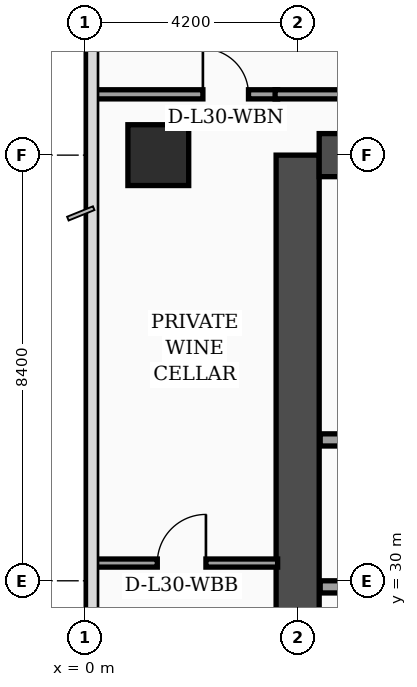
"""IFC4 building model, lengths in metres.
Left out: names, types, materials, properties, quantities, classifications, styles, units other than length and angle.
Written with IfcOpenShell. Run it as: python <this file> out.ifc"""

import sys

from ifc_helpers import new_model, si_unit, direction, frame, frame_2d, origin, origin_2d, place, context, subcontext, project, spatial, rectangle, extrude, element, fill, save


model = new_model("IFC4")
c1 = context("Model", 3, precision=1e-05, world=origin(), true_north=direction((0.0, 1.0)))
c2 = subcontext(c1, "Body", "Model", "MODEL_VIEW")
j1 = project(units=[si_unit("LENGTHUNIT", "METRE"), si_unit("PLANEANGLEUNIT", "RADIAN")], contexts=[c1])
p1 = place(None, origin())
s1 = spatial("IfcSite", under=j1, at=p1, CompositionType="ELEMENT")
p2 = place(p1, origin())
s2 = spatial("IfcBuilding", under=s1, at=p2, CompositionType="ELEMENT")
p3 = place(p2, frame((0.0, 0.0, 124.0)))
s3 = spatial("IfcBuildingStorey", under=s2, at=p3, CompositionType="ELEMENT", Elevation=124.0)
p4 = place(p3, frame((4.2, 16.8, 0.0), z_axis=(0.0, 0.0, 1.0), x_axis=(0.0, 1.0, 0.0)))
e1 = element("IfcWall", 1, at=p4, inside=s3, PredefinedType="SHEAR", context=c2, shape_type="SweptSolid", body=[
    extrude(rectangle(XDim=21.6, YDim=0.85, at=frame_2d((10.8, 0.0))), origin(), (0.0, 0.0, 1.0), 3.56),
])
p5 = place(p3, frame((4.625, 38.4, 0.0), z_axis=(0.0, 0.0, 1.0), x_axis=(1.0, 0.0, 0.0)))
e2 = element("IfcWall", 2, at=p5, inside=s3, PredefinedType="SHEAR", context=c2, shape_type="SweptSolid", body=[
    extrude(rectangle(XDim=9.95, YDim=0.85, at=frame_2d((4.975, 0.0))), origin(), (0.0, 0.0, 1.0), 3.56),
])
p6 = place(p3, frame((1.45, 38.4, 0.0), z_axis=(0.0, 0.0, 1.0), x_axis=(1.0, 0.0, 0.0)))
e3 = element("IfcColumn", 3, at=p6, inside=s3, PredefinedType="COLUMN", context=c2, shape_type="SweptSolid", body=[
    extrude(rectangle(XDim=1.2, YDim=1.2, at=origin_2d()), origin(), (0.0, 0.0, 1.0), 3.56),
])
p7 = place(p3, frame((4.645, 29.88, 0.0), z_axis=(0.0, 0.0, 1.0), x_axis=(1.0, 0.0, 0.0)))
e4 = element("IfcWall", 4, at=p7, inside=s3, PredefinedType="SOLIDWALL", context=c2, shape_type="SweptSolid", body=[
    extrude(rectangle(XDim=4.775, YDim=0.24, at=frame_2d((2.387, 0.0))), origin(), (0.0, 0.0, 1.0), 3.56),
])
p8 = place(p7, frame((0.45, 0.0, 0.0)))
e5 = element("IfcOpeningElement", 5, at=p8, cuts=e4, PredefinedType="OPENING", context=c2, shape_type="SweptSolid", body=[
    extrude(rectangle(XDim=1.3, YDim=2.35, at=frame_2d((0.65, 1.175))), frame((0.0, 0.13, 0.0), z_axis=(0.0, -1.0, 0.0), x_axis=(1.0, 0.0, 0.0)), (0.0, 0.0, 1.0), 0.26),
])
p9 = place(p3, frame((4.645, 32.78, 0.0), z_axis=(0.0, 0.0, 1.0), x_axis=(1.0, 0.0, 0.0)))
e6 = element("IfcWall", 6, at=p9, inside=s3, PredefinedType="SOLIDWALL", context=c2, shape_type="SweptSolid", body=[
    extrude(rectangle(XDim=4.775, YDim=0.24, at=frame_2d((2.387, 0.0))), origin(), (0.0, 0.0, 1.0), 3.19),
])
p10 = place(p3, frame((0.08, 30.35, 0.0), z_axis=(0.0, 0.0, 1.0), x_axis=(1.0, 0.0, 0.0)))
e7 = element("IfcWall", 7, at=p10, inside=s3, PredefinedType="PARTITIONING", context=c2, shape_type="SweptSolid", body=[
    extrude(rectangle(XDim=3.725, YDim=0.16, at=frame_2d((1.862, 0.0))), origin(), (0.0, 0.0, 1.0), 3.04),
])
p11 = place(p10, frame((1.35, 0.0, 0.0)))
e8 = element("IfcOpeningElement", 8, at=p11, cuts=e7, PredefinedType="OPENING", context=c2, shape_type="SweptSolid", body=[
    extrude(rectangle(XDim=0.96, YDim=2.2, at=frame_2d((0.48, 1.1))), frame((0.0, 0.09, 0.0), z_axis=(0.0, -1.0, 0.0), x_axis=(1.0, 0.0, 0.0)), (0.0, 0.0, 1.0), 0.18),
])
p12 = place(p3, frame((0.08, 39.6, 0.0), z_axis=(0.0, 0.0, 1.0), x_axis=(1.0, 0.0, 0.0)))
e9 = element("IfcWall", 9, at=p12, inside=s3, PredefinedType="PARTITIONING", context=c2, shape_type="SweptSolid", body=[
    extrude(rectangle(XDim=3.725, YDim=0.18, at=frame_2d((1.862, 0.0))), origin(), (0.0, 0.0, 1.0), 2.84),
])
p13 = place(p12, frame((2.25, 0.0, 0.0)))
e10 = element("IfcOpeningElement", 10, at=p13, cuts=e9, PredefinedType="OPENING", context=c2, shape_type="SweptSolid", body=[
    extrude(rectangle(XDim=0.9, YDim=2.15, at=frame_2d((0.45, 1.075))), frame((0.0, 0.1, 0.0), z_axis=(0.0, -1.0, 0.0), x_axis=(1.0, 0.0, 0.0)), (0.0, 0.0, 1.0), 0.2),
])
p14 = place(p3, frame((3.755, 39.6, 0.0), z_axis=(0.0, 0.0, 1.0), x_axis=(1.0, 0.0, 0.0)))
e11 = element("IfcWall", 11, at=p14, inside=s3, PredefinedType="PARTITIONING", context=c2, shape_type="SweptSolid", body=[
    extrude(rectangle(XDim=11.395, YDim=0.18, at=frame_2d((5.698, 0.0))), origin(), (0.0, 0.0, 1.0), 2.84),
])
p15 = place(p11, origin())
e12 = element("IfcDoor", 12, at=p15, inside=s3, OperationType="SINGLE_SWING_RIGHT", PredefinedType="DOOR", context=c2, shape_type="SweptSolid", body=[
    extrude(rectangle(XDim=0.96, YDim=2.2, at=frame_2d((0.48, 1.1))), frame((0.0, 0.025, 0.0), z_axis=(0.0, -1.0, 0.0), x_axis=(1.0, 0.0, 0.0)), (0.0, 0.0, 1.0), 0.05),
])
fill(e8, e12)
p16 = place(p13, origin())
e13 = element("IfcDoor", 13, at=p16, inside=s3, OperationType="SINGLE_SWING_LEFT", PredefinedType="DOOR", context=c2, shape_type="SweptSolid", body=[
    extrude(rectangle(XDim=0.9, YDim=2.15, at=frame_2d((0.45, 1.075))), frame((0.0, 0.025, 0.0), z_axis=(0.0, -1.0, 0.0), x_axis=(1.0, 0.0, 0.0)), (0.0, 0.0, 1.0), 0.05),
])
fill(e10, e13)
save(model, sys.argv[1])
